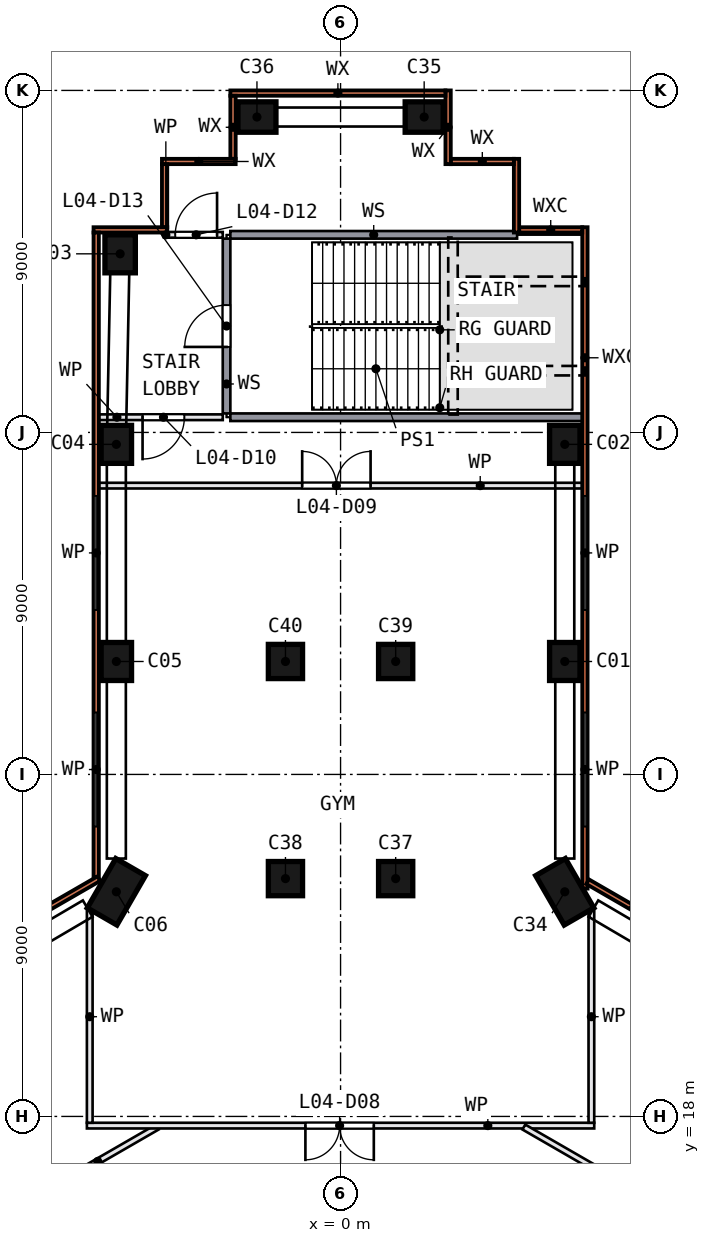
"""IFC4 building model, lengths in metres.
Left out: names, types, materials, properties, quantities, classifications, styles, units other than length and angle.
Written with IfcOpenShell. Run it as: python <this file> out.ifc"""

import sys

from ifc_helpers import new_model, si_unit, direction, frame, frame_2d, origin, origin_2d, place, context, subcontext, project, spatial, rectangle, extrude, element, fill, save


model = new_model("IFC4")
c1 = context("Model", 3, precision=1e-05, world=origin(), true_north=direction((0.0, 1.0)))
c2 = subcontext(c1, "Body", "Model", "MODEL_VIEW")
j1 = project(units=[si_unit("LENGTHUNIT", "METRE"), si_unit("PLANEANGLEUNIT", "RADIAN")], contexts=[c1])
p1 = place(None, origin())
s1 = spatial("IfcSite", under=j1, at=p1, CompositionType="ELEMENT")
p2 = place(p1, origin())
s2 = spatial("IfcBuilding", under=s1, at=p2, CompositionType="ELEMENT")
p3 = place(p2, frame((0.0, 0.0, 23.5)))
s3 = spatial("IfcBuildingStorey", under=s2, at=p3, CompositionType="ELEMENT", Elevation=23.5)
for number, where, z_axis, x_axis in (
    (1, (5.9, 29.972, 0.0), (0.0, 0.0, 1.0), (0.0, 1.0, 0.0)),
    (2, (5.9, 35.686, 0.0), (0.0, 0.0, 1.0), (0.0, 1.0, 0.0)),
    (3, (-5.8, 40.7, 0.0), (0.0, 0.0, 1.0), (0.0, -1.0, 0.0)),
    (4, (-5.9, 35.686, 0.0), (0.0, 0.0, 1.0), (0.0, -1.0, 0.0)),
    (5, (-5.9, 29.972, 0.0), (0.0, 0.0, 1.0), (0.0, -1.0, 0.0)),
):
    element("IfcColumn", number, at=place(p3, frame(where, z_axis=z_axis, x_axis=x_axis)), inside=s3, PredefinedType="COLUMN", context=c2, shape_type="SweptSolid", body=[
        extrude(rectangle(XDim=1.0, YDim=0.8, at=origin_2d()), origin(), (0.0, 0.0, 1.0), 4.0),
    ])
for number, where, z_axis, x_axis in (
    (6, (-5.9, 23.912, 0.0), (0.0, 0.0, 1.0), (0.5, 0.866, 0.0)),
    (7, (5.9, 23.912, 0.0), (0.0, 0.0, 1.0), (0.5, -0.866, 0.0)),
):
    element("IfcColumn", number, at=place(p3, frame(where, z_axis=z_axis, x_axis=x_axis)), inside=s3, PredefinedType="COLUMN", context=c2, shape_type="SweptSolid", body=[
        extrude(rectangle(XDim=1.5, YDim=0.9, at=origin_2d()), origin(), (0.0, 0.0, 1.0), 4.0),
    ])
for number, where, z_axis, x_axis in (
    (8, (2.2, 44.3, 0.0), (0.0, 0.0, 1.0), (-1.0, 0.0, 0.0)),
    (9, (-2.2, 44.3, 0.0), (0.0, 0.0, 1.0), (-1.0, 0.0, 0.0)),
):
    element("IfcColumn", number, at=place(p3, frame(where, z_axis=z_axis, x_axis=x_axis)), inside=s3, PredefinedType="COLUMN", context=c2, shape_type="SweptSolid", body=[
        extrude(rectangle(XDim=1.0, YDim=0.8, at=origin_2d()), origin(), (0.0, 0.0, 1.0), 4.0),
    ])
for number, where, z_axis, x_axis in (
    (10, (1.45, 24.258, 0.0), (0.0, 0.0, 1.0), (0.0, 1.0, 0.0)),
    (11, (-1.45, 24.258, 0.0), (0.0, 0.0, 1.0), (0.0, 1.0, 0.0)),
    (12, (1.45, 29.972, 0.0), (0.0, 0.0, 1.0), (0.0, 1.0, 0.0)),
    (13, (-1.45, 29.972, 0.0), (0.0, 0.0, 1.0), (0.0, 1.0, 0.0)),
):
    element("IfcColumn", number, at=place(p3, frame(where, z_axis=z_axis, x_axis=x_axis)), inside=s3, PredefinedType="COLUMN", context=c2, shape_type="SweptSolid", body=[
        extrude(rectangle(XDim=0.9, YDim=0.9, at=origin_2d()), origin(), (0.0, 0.0, 1.0), 4.0),
    ])
p4 = place(p3, frame((6.43, 23.995, 0.0), z_axis=(0.0, 0.0, 1.0), x_axis=(0.0, 1.0, 0.0)))
e14 = element("IfcWall", 14, at=p4, inside=s3, PredefinedType="SOLIDWALL", context=c2, shape_type="SweptSolid", body=[
    extrude(rectangle(XDim=17.405, YDim=0.14, at=frame_2d((8.702, 0.0))), origin(), (0.0, 0.0, 1.0), 4.0),
])
p5 = place(p4, frame((1.634, 0.0, 0.9)))
e15 = element("IfcOpeningElement", 15, at=p5, cuts=e14, PredefinedType="OPENING", context=c2, shape_type="SweptSolid", body=[
    extrude(rectangle(XDim=3.0, YDim=2.4, at=frame_2d((1.5, 1.2))), frame((0.0, 0.08, 0.0), z_axis=(0.0, -1.0, 0.0), x_axis=(1.0, 0.0, 0.0)), (0.0, 0.0, 1.0), 0.16),
])
p6 = place(p4, frame((7.334, 0.0, 0.9)))
e16 = element("IfcOpeningElement", 16, at=p6, cuts=e14, PredefinedType="OPENING", context=c2, shape_type="SweptSolid", body=[
    extrude(rectangle(XDim=3.0, YDim=2.4, at=frame_2d((1.5, 1.2))), frame((0.0, 0.08, 0.0), z_axis=(0.0, -1.0, 0.0), x_axis=(1.0, 0.0, 0.0)), (0.0, 0.0, 1.0), 0.16),
])
p7 = place(p3, frame((6.36, 41.33, 0.0), z_axis=(0.0, 0.0, 1.0), x_axis=(-1.0, 0.0, 0.0)))
e17 = element("IfcWall", 17, at=p7, inside=s3, PredefinedType="SOLIDWALL", context=c2, shape_type="SweptSolid", body=[
    extrude(rectangle(XDim=1.66, YDim=0.14, at=frame_2d((0.83, 0.0))), origin(), (0.0, 0.0, 1.0), 4.0),
])
p8 = place(p3, frame((4.63, 41.26, 0.0), z_axis=(0.0, 0.0, 1.0), x_axis=(0.0, 1.0, 0.0)))
e18 = element("IfcWall", 18, at=p8, inside=s3, PredefinedType="SOLIDWALL", context=c2, shape_type="SweptSolid", body=[
    extrude(rectangle(XDim=1.94, YDim=0.14, at=frame_2d((0.97, 0.0))), origin(), (0.0, 0.0, 1.0), 4.0),
])
p9 = place(p3, frame((4.56, 43.13, 0.0), z_axis=(0.0, 0.0, 1.0), x_axis=(-1.0, 0.0, 0.0)))
e19 = element("IfcWall", 19, at=p9, inside=s3, PredefinedType="SOLIDWALL", context=c2, shape_type="SweptSolid", body=[
    extrude(rectangle(XDim=1.66, YDim=0.14, at=frame_2d((0.83, 0.0))), origin(), (0.0, 0.0, 1.0), 4.0),
])
p10 = place(p3, frame((2.83, 43.06, 0.0), z_axis=(0.0, 0.0, 1.0), x_axis=(0.0, 1.0, 0.0)))
e20 = element("IfcWall", 20, at=p10, inside=s3, PredefinedType="SOLIDWALL", context=c2, shape_type="SweptSolid", body=[
    extrude(rectangle(XDim=1.94, YDim=0.14, at=frame_2d((0.97, 0.0))), origin(), (0.0, 0.0, 1.0), 4.0),
])
p11 = place(p3, frame((2.76, 44.93, 0.0), z_axis=(0.0, 0.0, 1.0), x_axis=(-1.0, 0.0, 0.0)))
e21 = element("IfcWall", 21, at=p11, inside=s3, PredefinedType="SOLIDWALL", context=c2, shape_type="SweptSolid", body=[
    extrude(rectangle(XDim=5.66, YDim=0.14, at=frame_2d((2.83, 0.0))), origin(), (0.0, 0.0, 1.0), 4.0),
])
p12 = place(p3, frame((-2.83, 44.86, 0.0), z_axis=(0.0, 0.0, 1.0), x_axis=(0.0, -1.0, 0.0)))
e22 = element("IfcWall", 22, at=p12, inside=s3, PredefinedType="SOLIDWALL", context=c2, shape_type="SweptSolid", body=[
    extrude(rectangle(XDim=1.66, YDim=0.14, at=frame_2d((0.83, 0.0))), origin(), (0.0, 0.0, 1.0), 4.0),
])
p13 = place(p3, frame((-2.76, 43.13, 0.0), z_axis=(0.0, 0.0, 1.0), x_axis=(-1.0, 0.0, 0.0)))
e23 = element("IfcWall", 23, at=p13, inside=s3, PredefinedType="SOLIDWALL", context=c2, shape_type="SweptSolid", body=[
    extrude(rectangle(XDim=1.94, YDim=0.14, at=frame_2d((0.97, 0.0))), origin(), (0.0, 0.0, 1.0), 4.0),
])
p14 = place(p3, frame((-4.63, 43.06, 0.0), z_axis=(0.0, 0.0, 1.0), x_axis=(0.0, -1.0, 0.0)))
e24 = element("IfcWall", 24, at=p14, inside=s3, PredefinedType="SOLIDWALL", context=c2, shape_type="SweptSolid", body=[
    extrude(rectangle(XDim=1.66, YDim=0.14, at=frame_2d((0.83, 0.0))), origin(), (0.0, 0.0, 1.0), 4.0),
])
p15 = place(p3, frame((-4.56, 41.33, 0.0), z_axis=(0.0, 0.0, 1.0), x_axis=(-1.0, 0.0, 0.0)))
e25 = element("IfcWall", 25, at=p15, inside=s3, PredefinedType="SOLIDWALL", context=c2, shape_type="SweptSolid", body=[
    extrude(rectangle(XDim=1.94, YDim=0.14, at=frame_2d((0.97, 0.0))), origin(), (0.0, 0.0, 1.0), 4.0),
])
p16 = place(p3, frame((-6.43, 41.26, 0.0), z_axis=(0.0, 0.0, 1.0), x_axis=(0.0, -1.0, 0.0)))
e26 = element("IfcWall", 26, at=p16, inside=s3, PredefinedType="SOLIDWALL", context=c2, shape_type="SweptSolid", body=[
    extrude(rectangle(XDim=16.961, YDim=0.14, at=frame_2d((8.481, 0.0))), origin(), (0.0, 0.0, 1.0), 4.0),
])
p17 = place(p16, frame((6.931, 0.0, 0.9)))
e27 = element("IfcOpeningElement", 27, at=p17, cuts=e26, PredefinedType="OPENING", context=c2, shape_type="SweptSolid", body=[
    extrude(rectangle(XDim=3.0, YDim=2.4, at=frame_2d((1.5, 1.2))), frame((0.0, 0.08, 0.0), z_axis=(0.0, -1.0, 0.0), x_axis=(1.0, 0.0, 0.0)), (0.0, 0.0, 1.0), 0.16),
])
p18 = place(p16, frame((12.631, 0.0, 0.9)))
e28 = element("IfcOpeningElement", 28, at=p18, cuts=e26, PredefinedType="OPENING", context=c2, shape_type="SweptSolid", body=[
    extrude(rectangle(XDim=3.0, YDim=2.4, at=frame_2d((1.5, 1.2))), frame((0.0, 0.08, 0.0), z_axis=(0.0, -1.0, 0.0), x_axis=(1.0, 0.0, 0.0)), (0.0, 0.0, 1.0), 0.16),
])
p19 = place(p3, frame((-6.36, 24.258, 0.0), z_axis=(0.0, 0.0, 1.0), x_axis=(-0.866029009, -0.499993756, 0.0)))
e29 = element("IfcWall", 29, at=p19, inside=s3, PredefinedType="SOLIDWALL", context=c2, shape_type="SweptSolid", body=[
    extrude(rectangle(XDim=13.242, YDim=0.14, at=frame_2d((6.621, 0.0))), origin(), (0.0, 0.0, 1.0), 4.0),
])
p20 = place(p19, frame((1.46, 0.0, 0.9)))
e30 = element("IfcOpeningElement", 30, at=p20, cuts=e29, PredefinedType="OPENING", context=c2, shape_type="SweptSolid", body=[
    extrude(rectangle(XDim=3.6, YDim=2.4, at=frame_2d((1.8, 1.2))), frame((0.0, 0.08, 0.0), z_axis=(0.0, -1.0, 0.0), x_axis=(1.0, 0.0, 0.0)), (0.0, 0.0, 1.0), 0.16),
])
p21 = place(p19, frame((8.215, 0.0, 0.9)))
e31 = element("IfcOpeningElement", 31, at=p21, cuts=e29, PredefinedType="OPENING", context=c2, shape_type="SweptSolid", body=[
    extrude(rectangle(XDim=3.0, YDim=2.4, at=frame_2d((1.5, 1.2))), frame((0.0, 0.08, 0.0), z_axis=(0.0, -1.0, 0.0), x_axis=(1.0, 0.0, 0.0)), (0.0, 0.0, 1.0), 0.16),
])
p22 = place(p3, frame((17.586, 17.777, 0.0), z_axis=(0.0, 0.0, 1.0), x_axis=(-0.866023287, 0.500003667, 0.0)))
e32 = element("IfcWall", 32, at=p22, inside=s3, PredefinedType="SOLIDWALL", context=c2, shape_type="SweptSolid", body=[
    extrude(rectangle(XDim=12.801, YDim=0.14, at=frame_2d((6.4, 0.0))), origin(), (0.0, 0.0, 1.0), 4.0),
])
p23 = place(p22, frame((1.748, 0.0, 0.9)))
e33 = element("IfcOpeningElement", 33, at=p23, cuts=e32, PredefinedType="OPENING", context=c2, shape_type="SweptSolid", body=[
    extrude(rectangle(XDim=3.0, YDim=2.4, at=frame_2d((1.5, 1.2))), frame((0.0, 0.08, 0.0), z_axis=(0.0, -1.0, 0.0), x_axis=(1.0, 0.0, 0.0)), (0.0, 0.0, 1.0), 0.16),
])
p24 = place(p22, frame((7.902, 0.0, 0.9)))
e34 = element("IfcOpeningElement", 34, at=p24, cuts=e32, PredefinedType="OPENING", context=c2, shape_type="SweptSolid", body=[
    extrude(rectangle(XDim=3.6, YDim=2.4, at=frame_2d((1.8, 1.2))), frame((0.0, 0.08, 0.0), z_axis=(0.0, -1.0, 0.0), x_axis=(1.0, 0.0, 0.0)), (0.0, 0.0, 1.0), 0.16),
])
p25 = place(p3, frame((-4.823, 17.721, 0.0), z_axis=(0.0, 0.0, 1.0), x_axis=(-0.866037142, -0.499979668, 0.0)))
e35 = element("IfcWall", 35, at=p25, inside=s3, PredefinedType="PARTITIONING", context=c2, shape_type="SweptSolid", body=[
    extrude(rectangle(XDim=9.367, YDim=0.15, at=frame_2d((4.683, 0.0))), origin(), (0.0, 0.0, 1.0), 4.0),
])
p26 = place(p25, frame((3.817, 0.0, 0.0)))
e36 = element("IfcOpeningElement", 36, at=p26, cuts=e35, PredefinedType="OPENING", context=c2, shape_type="SweptSolid", body=[
    extrude(rectangle(XDim=1.8, YDim=2.1, at=frame_2d((0.9, 1.05))), frame((0.0, 0.085, 0.0), z_axis=(0.0, -1.0, 0.0), x_axis=(1.0, 0.0, 0.0)), (0.0, 0.0, 1.0), 0.17),
])
p27 = place(p3, frame((6.675, 17.758, 0.0), z_axis=(0.0, 0.0, 1.0), x_axis=(-1.0, 0.0, 0.0)))
e37 = element("IfcWall", 37, at=p27, inside=s3, PredefinedType="PARTITIONING", context=c2, shape_type="SweptSolid", body=[
    extrude(rectangle(XDim=13.35, YDim=0.15, at=frame_2d((6.675, 0.0))), origin(), (0.0, 0.0, 1.0), 4.0),
])
p28 = place(p27, frame((5.8, 0.0, 0.0)))
e38 = element("IfcOpeningElement", 38, at=p28, cuts=e37, PredefinedType="OPENING", context=c2, shape_type="SweptSolid", body=[
    extrude(rectangle(XDim=1.8, YDim=2.1, at=frame_2d((0.9, 1.05))), frame((0.0, 0.085, 0.0), z_axis=(0.0, -1.0, 0.0), x_axis=(1.0, 0.0, 0.0)), (0.0, 0.0, 1.0), 0.17),
])
p29 = place(p3, frame((-6.6, 23.415, 0.0), z_axis=(0.0, 0.0, 1.0), x_axis=(0.0, -1.0, 0.0)))
e39 = element("IfcWall", 39, at=p29, inside=s3, PredefinedType="PARTITIONING", context=c2, shape_type="SweptSolid", body=[
    extrude(rectangle(XDim=5.582, YDim=0.15, at=frame_2d((2.791, 0.0))), origin(), (0.0, 0.0, 1.0), 4.0),
])
p30 = place(p3, frame((-6.36, 34.6, 0.0), z_axis=(0.0, 0.0, 1.0), x_axis=(1.0, 0.0, 0.0)))
e40 = element("IfcWall", 40, at=p30, inside=s3, PredefinedType="PARTITIONING", context=c2, shape_type="SweptSolid", body=[
    extrude(rectangle(XDim=12.72, YDim=0.15, at=frame_2d((6.36, 0.0))), origin(), (0.0, 0.0, 1.0), 4.0),
])
p31 = place(p30, frame((5.35, 0.0, 0.0)))
e41 = element("IfcOpeningElement", 41, at=p31, cuts=e40, PredefinedType="OPENING", context=c2, shape_type="SweptSolid", body=[
    extrude(rectangle(XDim=1.8, YDim=2.1, at=frame_2d((0.9, 1.05))), frame((0.0, 0.085, 0.0), z_axis=(0.0, -1.0, 0.0), x_axis=(1.0, 0.0, 0.0)), (0.0, 0.0, 1.0), 0.17),
])
p32 = place(p3, frame((-3.1, 36.4, 0.0), z_axis=(0.0, 0.0, 1.0), x_axis=(-1.0, 0.0, 0.0)))
e42 = element("IfcWall", 42, at=p32, inside=s3, PredefinedType="PARTITIONING", context=c2, shape_type="SweptSolid", body=[
    extrude(rectangle(XDim=3.26, YDim=0.15, at=frame_2d((1.63, 0.0))), origin(), (0.0, 0.0, 1.0), 4.0),
])
p33 = place(p32, frame((1.01, 0.0, 0.0)))
e43 = element("IfcOpeningElement", 43, at=p33, cuts=e42, PredefinedType="OPENING", context=c2, shape_type="SweptSolid", body=[
    extrude(rectangle(XDim=1.1, YDim=2.1, at=frame_2d((0.55, 1.05))), frame((0.0, 0.085, 0.0), z_axis=(0.0, -1.0, 0.0), x_axis=(1.0, 0.0, 0.0)), (0.0, 0.0, 1.0), 0.17),
])
p34 = place(p3, frame((-2.9, 36.4, 0.0), z_axis=(0.0, 0.0, 1.0), x_axis=(1.0, 0.0, 0.0)))
e44 = element("IfcWall", 44, at=p34, inside=s3, PredefinedType="SOLIDWALL", context=c2, shape_type="SweptSolid", body=[
    extrude(rectangle(XDim=9.26, YDim=0.2, at=frame_2d((4.63, 0.0))), origin(), (0.0, 0.0, 1.0), 4.0),
])
p35 = place(p3, frame((-4.645, 41.2, 0.0), z_axis=(0.0, 0.0, 1.0), x_axis=(1.0, 0.0, 0.0)))
e45 = element("IfcWall", 45, at=p35, inside=s3, PredefinedType="PARTITIONING", context=c2, shape_type="SweptSolid", body=[
    extrude(rectangle(XDim=1.545, YDim=0.15, at=frame_2d((0.772, 0.0))), origin(), (0.0, 0.0, 1.0), 4.0),
])
p36 = place(p35, frame((0.295, 0.0, 0.0)))
e46 = element("IfcOpeningElement", 46, at=p36, cuts=e45, PredefinedType="OPENING", context=c2, shape_type="SweptSolid", body=[
    extrude(rectangle(XDim=1.1, YDim=2.1, at=frame_2d((0.55, 1.05))), frame((0.0, 0.085, 0.0), z_axis=(0.0, -1.0, 0.0), x_axis=(1.0, 0.0, 0.0)), (0.0, 0.0, 1.0), 0.17),
])
p37 = place(p3, frame((-3.0, 36.5, 0.0), z_axis=(0.0, 0.0, 1.0), x_axis=(0.0, 1.0, 0.0)))
e47 = element("IfcWall", 47, at=p37, inside=s3, PredefinedType="SOLIDWALL", context=c2, shape_type="SweptSolid", body=[
    extrude(rectangle(XDim=4.6, YDim=0.2, at=frame_2d((2.3, 0.0))), origin(), (0.0, 0.0, 1.0), 4.0),
])
p38 = place(p37, frame((1.75, 0.0, 0.0)))
e48 = element("IfcOpeningElement", 48, at=p38, cuts=e47, PredefinedType="OPENING", context=c2, shape_type="SweptSolid", body=[
    extrude(rectangle(XDim=1.1, YDim=2.1, at=frame_2d((0.55, 1.05))), frame((0.0, 0.11, 0.0), z_axis=(0.0, -1.0, 0.0), x_axis=(1.0, 0.0, 0.0)), (0.0, 0.0, 1.0), 0.22),
])
p39 = place(p3, frame((4.823, 17.721, 0.0), z_axis=(0.0, 0.0, 1.0), x_axis=(0.866037142, -0.499979668, 0.0)))
e49 = element("IfcWall", 49, at=p39, inside=s3, PredefinedType="PARTITIONING", context=c2, shape_type="SweptSolid", body=[
    extrude(rectangle(XDim=9.367, YDim=0.15, at=frame_2d((4.683, 0.0))), origin(), (0.0, 0.0, 1.0), 4.0),
])
p40 = place(p39, frame((4.15, 0.0, 0.0)))
e50 = element("IfcOpeningElement", 50, at=p40, cuts=e49, PredefinedType="OPENING", context=c2, shape_type="SweptSolid", body=[
    extrude(rectangle(XDim=1.0, YDim=2.1, at=frame_2d((0.5, 1.05))), frame((0.0, 0.085, 0.0), z_axis=(0.0, -1.0, 0.0), x_axis=(1.0, 0.0, 0.0)), (0.0, 0.0, 1.0), 0.17),
])
p41 = place(p3, frame((4.645, 41.2, 0.0), z_axis=(0.0, 0.0, 1.0), x_axis=(-1.0, 0.0, 0.0)))
e51 = element("IfcWall", 51, at=p41, inside=s3, PredefinedType="SOLIDWALL", context=c2, shape_type="SweptSolid", body=[
    extrude(rectangle(XDim=7.545, YDim=0.2, at=frame_2d((3.772, 0.0))), origin(), (0.0, 0.0, 1.0), 4.0),
])
p42 = place(p3, frame((6.6, 17.833, 0.0), z_axis=(0.0, 0.0, 1.0), x_axis=(0.0, 1.0, 0.0)))
e52 = element("IfcWall", 52, at=p42, inside=s3, PredefinedType="PARTITIONING", context=c2, shape_type="SweptSolid", body=[
    extrude(rectangle(XDim=5.582, YDim=0.15, at=frame_2d((2.791, 0.0))), origin(), (0.0, 0.0, 1.0), 4.0),
])
p43 = place(p5, origin())
e53 = element("IfcWindow", 53, at=p43, inside=s3, PartitioningType="SINGLE_PANEL", PredefinedType="WINDOW", context=c2, shape_type="SweptSolid", body=[
    extrude(rectangle(XDim=3.0, YDim=2.4, at=frame_2d((1.5, 1.2))), frame((0.0, 0.03, 0.0), z_axis=(0.0, -1.0, 0.0), x_axis=(1.0, 0.0, 0.0)), (0.0, 0.0, 1.0), 0.06),
])
fill(e15, e53)
p44 = place(p6, origin())
e54 = element("IfcWindow", 54, at=p44, inside=s3, PartitioningType="SINGLE_PANEL", PredefinedType="WINDOW", context=c2, shape_type="SweptSolid", body=[
    extrude(rectangle(XDim=3.0, YDim=2.4, at=frame_2d((1.5, 1.2))), frame((0.0, 0.03, 0.0), z_axis=(0.0, -1.0, 0.0), x_axis=(1.0, 0.0, 0.0)), (0.0, 0.0, 1.0), 0.06),
])
fill(e16, e54)
p45 = place(p17, origin())
e55 = element("IfcWindow", 55, at=p45, inside=s3, PartitioningType="SINGLE_PANEL", PredefinedType="WINDOW", context=c2, shape_type="SweptSolid", body=[
    extrude(rectangle(XDim=3.0, YDim=2.4, at=frame_2d((1.5, 1.2))), frame((0.0, 0.03, 0.0), z_axis=(0.0, -1.0, 0.0), x_axis=(1.0, 0.0, 0.0)), (0.0, 0.0, 1.0), 0.06),
])
fill(e27, e55)
p46 = place(p18, origin())
e56 = element("IfcWindow", 56, at=p46, inside=s3, PartitioningType="SINGLE_PANEL", PredefinedType="WINDOW", context=c2, shape_type="SweptSolid", body=[
    extrude(rectangle(XDim=3.0, YDim=2.4, at=frame_2d((1.5, 1.2))), frame((0.0, 0.03, 0.0), z_axis=(0.0, -1.0, 0.0), x_axis=(1.0, 0.0, 0.0)), (0.0, 0.0, 1.0), 0.06),
])
fill(e28, e56)
p47 = place(p28, origin())
e57 = element("IfcDoor", 57, at=p47, inside=s3, OperationType="DOUBLE_DOOR_SINGLE_SWING", PredefinedType="DOOR", context=c2, shape_type="SweptSolid", body=[
    extrude(rectangle(XDim=1.8, YDim=2.1, at=frame_2d((0.9, 1.05))), frame((0.0, 0.025, 0.0), z_axis=(0.0, -1.0, 0.0), x_axis=(1.0, 0.0, 0.0)), (0.0, 0.0, 1.0), 0.05),
])
fill(e38, e57)
p48 = place(p31, origin())
e58 = element("IfcDoor", 58, at=p48, inside=s3, OperationType="DOUBLE_DOOR_SINGLE_SWING", PredefinedType="DOOR", context=c2, shape_type="SweptSolid", body=[
    extrude(rectangle(XDim=1.8, YDim=2.1, at=frame_2d((0.9, 1.05))), frame((0.0, 0.025, 0.0), z_axis=(0.0, -1.0, 0.0), x_axis=(1.0, 0.0, 0.0)), (0.0, 0.0, 1.0), 0.05),
])
fill(e41, e58)
p49 = place(p33, origin())
e59 = element("IfcDoor", 59, at=p49, inside=s3, OperationType="SINGLE_SWING_RIGHT", PredefinedType="DOOR", context=c2, shape_type="SweptSolid", body=[
    extrude(rectangle(XDim=1.1, YDim=2.1, at=frame_2d((0.55, 1.05))), frame((0.0, 0.025, 0.0), z_axis=(0.0, -1.0, 0.0), x_axis=(1.0, 0.0, 0.0)), (0.0, 0.0, 1.0), 0.05),
])
fill(e43, e59)
p50 = place(p36, origin())
e60 = element("IfcDoor", 60, at=p50, inside=s3, OperationType="SINGLE_SWING_RIGHT", PredefinedType="DOOR", context=c2, shape_type="SweptSolid", body=[
    extrude(rectangle(XDim=1.1, YDim=2.1, at=frame_2d((0.55, 1.05))), frame((0.0, 0.025, 0.0), z_axis=(0.0, -1.0, 0.0), x_axis=(1.0, 0.0, 0.0)), (0.0, 0.0, 1.0), 0.05),
])
fill(e46, e60)
p51 = place(p38, origin())
e61 = element("IfcDoor", 61, at=p51, inside=s3, OperationType="SINGLE_SWING_LEFT", PredefinedType="DOOR", context=c2, shape_type="SweptSolid", body=[
    extrude(rectangle(XDim=1.1, YDim=2.1, at=frame_2d((0.55, 1.05))), frame((0.0, 0.025, 0.0), z_axis=(0.0, -1.0, 0.0), x_axis=(1.0, 0.0, 0.0)), (0.0, 0.0, 1.0), 0.05),
])
fill(e48, e61)
save(model, sys.argv[1])
